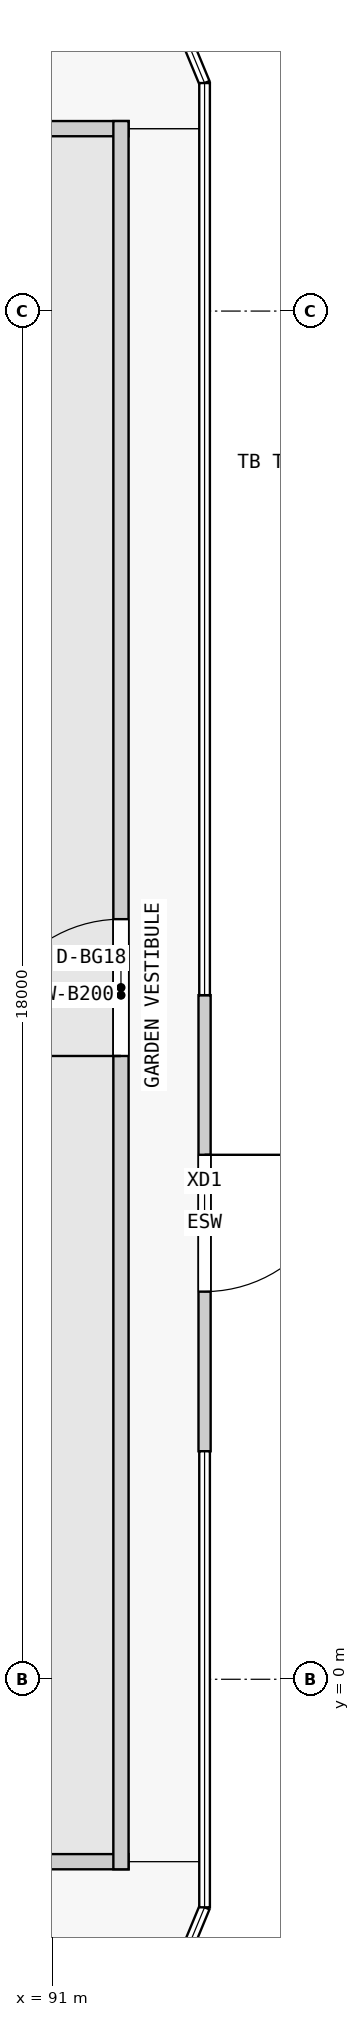
"""IFC4 building model, lengths in metres.
Left out: names, types, materials, properties, quantities, classifications, styles, units other than length and angle.
Written with IfcOpenShell. Run it as: python <this file> out.ifc"""

import sys

from ifc_helpers import new_model, si_unit, direction, frame, frame_2d, origin, place, context, subcontext, project, spatial, rectangle, extrude, element, fill, save


model = new_model("IFC4")
c1 = context("Model", 3, precision=1e-05, world=origin(), true_north=direction((0.0, 1.0)))
c2 = subcontext(c1, "Body", "Model", "MODEL_VIEW")
j1 = project(units=[si_unit("LENGTHUNIT", "METRE"), si_unit("PLANEANGLEUNIT", "RADIAN")], contexts=[c1])
p1 = place(None, origin())
s1 = spatial("IfcSite", under=j1, at=p1, CompositionType="ELEMENT")
p2 = place(p1, origin())
s2 = spatial("IfcBuilding", under=s1, at=p2, CompositionType="ELEMENT")
p3 = place(p2, frame((0.0, 0.0, 116.8)))
s3 = spatial("IfcBuildingStorey", under=s2, at=p3, CompositionType="ELEMENT", Elevation=116.8)
p4 = place(p3, frame((93.0, 9.0, 0.0), z_axis=(0.0, 0.0, 1.0), x_axis=(0.0, -1.0, 0.0)))
e1 = element("IfcWall", 1, at=p4, inside=s3, PredefinedType="STANDARD", context=c2, shape_type="SweptSolid", body=[
    extrude(rectangle(XDim=6.0, YDim=0.16, at=frame_2d((3.0, 0.0))), origin(), (0.0, 0.0, 1.0), 3.25),
])
p5 = place(p4, frame((2.1, 0.0, 0.0)))
e2 = element("IfcOpeningElement", 2, at=p5, cuts=e1, PredefinedType="OPENING", context=c2, shape_type="SweptSolid", body=[
    extrude(rectangle(XDim=1.8, YDim=2.4, at=frame_2d((0.9, 1.2))), frame((0.0, 0.09, 0.0), z_axis=(0.0, -1.0, 0.0), x_axis=(1.0, 0.0, 0.0)), (0.0, 0.0, 1.0), 0.18),
])
p6 = place(p3, frame((72.0, -2.4, 0.0), z_axis=(0.0, 0.0, 1.0), x_axis=(1.0, 0.0, 0.0)))
e3 = element("IfcWall", 3, at=p6, inside=s3, PredefinedType="PARTITIONING", context=c2, shape_type="SweptSolid", body=[
    extrude(rectangle(XDim=20.0, YDim=0.2, at=frame_2d((10.0, 0.0))), origin(), (0.0, 0.0, 1.0), 3.25),
])
p7 = place(p6, frame((6.1, 0.0, 0.0)))
e4 = element("IfcOpeningElement", 4, at=p7, cuts=e3, PredefinedType="OPENING", context=c2, shape_type="SweptSolid", body=[
    extrude(rectangle(XDim=1.8, YDim=2.1, at=frame_2d((0.9, 1.05))), frame((0.0, 0.11, 0.0), z_axis=(0.0, -1.0, 0.0), x_axis=(1.0, 0.0, 0.0)), (0.0, 0.0, 1.0), 0.22),
])
p8 = place(p6, frame((17.55, 0.0, 0.0)))
e5 = element("IfcOpeningElement", 5, at=p8, cuts=e3, PredefinedType="OPENING", context=c2, shape_type="SweptSolid", body=[
    extrude(rectangle(XDim=0.9, YDim=2.1, at=frame_2d((0.45, 1.05))), frame((0.0, 0.11, 0.0), z_axis=(0.0, -1.0, 0.0), x_axis=(1.0, 0.0, 0.0)), (0.0, 0.0, 1.0), 0.22),
])
p9 = place(p3, frame((72.0, 20.4, 0.0), z_axis=(0.0, 0.0, 1.0), x_axis=(1.0, 0.0, 0.0)))
e6 = element("IfcWall", 6, at=p9, inside=s3, PredefinedType="PARTITIONING", context=c2, shape_type="SweptSolid", body=[
    extrude(rectangle(XDim=20.0, YDim=0.2, at=frame_2d((10.0, 0.0))), origin(), (0.0, 0.0, 1.0), 3.25),
])
p10 = place(p9, frame((5.55, 0.0, 0.0)))
e7 = element("IfcOpeningElement", 7, at=p10, cuts=e6, PredefinedType="OPENING", context=c2, shape_type="SweptSolid", body=[
    extrude(rectangle(XDim=0.9, YDim=2.1, at=frame_2d((0.45, 1.05))), frame((0.0, 0.11, 0.0), z_axis=(0.0, -1.0, 0.0), x_axis=(1.0, 0.0, 0.0)), (0.0, 0.0, 1.0), 0.22),
])
p11 = place(p9, frame((15.55, 0.0, 0.0)))
e8 = element("IfcOpeningElement", 8, at=p11, cuts=e6, PredefinedType="OPENING", context=c2, shape_type="SweptSolid", body=[
    extrude(rectangle(XDim=0.9, YDim=2.1, at=frame_2d((0.45, 1.05))), frame((0.0, 0.11, 0.0), z_axis=(0.0, -1.0, 0.0), x_axis=(1.0, 0.0, 0.0)), (0.0, 0.0, 1.0), 0.22),
])
p12 = place(p3, frame((91.9, -2.5, 0.0), z_axis=(0.0, 0.0, 1.0), x_axis=(0.0, 1.0, 0.0)))
e9 = element("IfcWall", 9, at=p12, inside=s3, PredefinedType="PARTITIONING", context=c2, shape_type="SweptSolid", body=[
    extrude(rectangle(XDim=23.0, YDim=0.2, at=frame_2d((11.5, 0.0))), origin(), (0.0, 0.0, 1.0), 3.25),
])
p13 = place(p12, frame((10.7, 0.0, 0.0)))
e10 = element("IfcOpeningElement", 10, at=p13, cuts=e9, PredefinedType="OPENING", context=c2, shape_type="SweptSolid", body=[
    extrude(rectangle(XDim=1.8, YDim=2.1, at=frame_2d((0.9, 1.05))), frame((0.0, 0.11, 0.0), z_axis=(0.0, -1.0, 0.0), x_axis=(1.0, 0.0, 0.0)), (0.0, 0.0, 1.0), 0.22),
])
p14 = place(p5, origin())
e11 = element("IfcDoor", 11, at=p14, inside=s3, OperationType="SINGLE_SWING_LEFT", PredefinedType="DOOR", context=c2, shape_type="SweptSolid", body=[
    extrude(rectangle(XDim=1.8, YDim=2.4, at=frame_2d((0.9, 1.2))), frame((0.0, 0.025, 0.0), z_axis=(0.0, -1.0, 0.0), x_axis=(1.0, 0.0, 0.0)), (0.0, 0.0, 1.0), 0.05),
])
fill(e2, e11)
p15 = place(p13, origin())
e12 = element("IfcDoor", 12, at=p15, inside=s3, OperationType="DOUBLE_DOOR_SINGLE_SWING", PredefinedType="DOOR", context=c2, shape_type="SweptSolid", body=[
    extrude(rectangle(XDim=1.8, YDim=2.1, at=frame_2d((0.9, 1.05))), frame((0.0, 0.025, 0.0), z_axis=(0.0, -1.0, 0.0), x_axis=(1.0, 0.0, 0.0)), (0.0, 0.0, 1.0), 0.05),
])
fill(e10, e12)
save(model, sys.argv[1])
